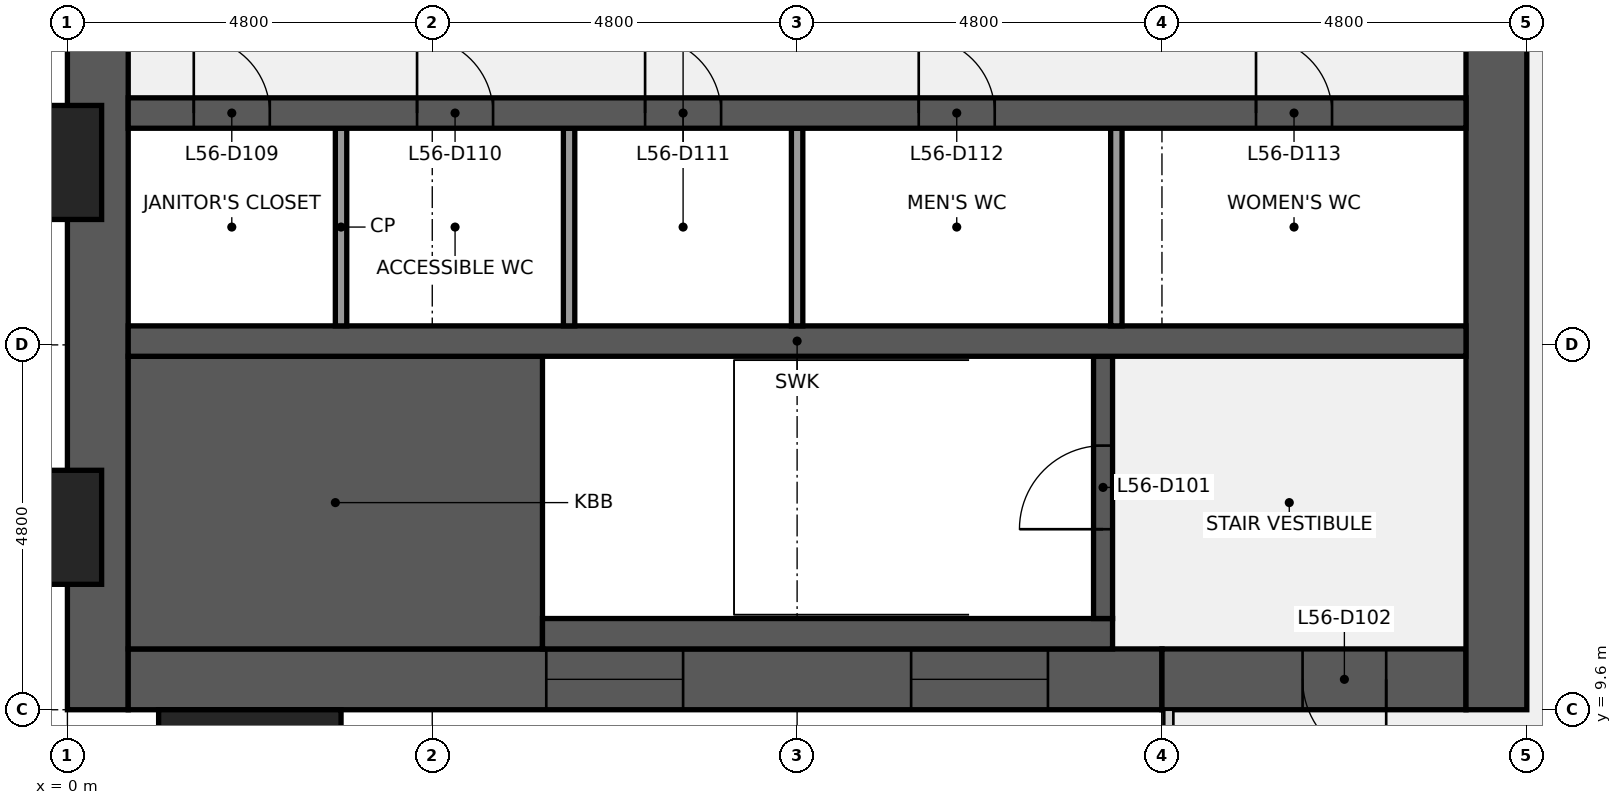
"""IFC4 building model, lengths in metres.
Left out: names, types, materials, properties, quantities, classifications, styles, units other than length and angle.
Written with IfcOpenShell. Run it as: python <this file> out.ifc"""

import sys

from ifc_helpers import new_model, si_unit, direction, frame, frame_2d, origin, origin_2d, place, context, subcontext, project, spatial, rectangle, extrude, element, fill, save


model = new_model("IFC4")
c1 = context("Model", 3, precision=1e-05, world=origin(), true_north=direction((0.0, 1.0)))
c2 = subcontext(c1, "Body", "Model", "MODEL_VIEW")
j1 = project(units=[si_unit("LENGTHUNIT", "METRE"), si_unit("PLANEANGLEUNIT", "RADIAN")], contexts=[c1])
p1 = place(None, origin())
s1 = spatial("IfcSite", under=j1, at=p1, CompositionType="ELEMENT")
p2 = place(p1, origin())
s2 = spatial("IfcBuilding", under=s1, at=p2, CompositionType="ELEMENT")
p3 = place(p2, frame((0.0, 0.0, 253.2)))
s3 = spatial("IfcBuildingStorey", under=s2, at=p3, CompositionType="ELEMENT", Elevation=253.2)
p4 = place(p3, frame((0.4, 9.6, 0.0), z_axis=(0.0, 0.0, 1.0), x_axis=(0.0, 1.0, 0.0)))
e1 = element("IfcWall", 1, at=p4, inside=s3, PredefinedType="SHEAR", context=c2, shape_type="SweptSolid", body=[
    extrude(rectangle(XDim=28.8, YDim=0.8, at=frame_2d((14.4, 0.0))), origin(), (0.0, 0.0, 1.0), 3.84),
])
p5 = place(p4, frame((8.85, 0.0, 0.9)))
e2 = element("IfcOpeningElement", 2, at=p5, cuts=e1, PredefinedType="OPENING", context=c2, shape_type="SweptSolid", body=[
    extrude(rectangle(XDim=1.5, YDim=1.5, at=frame_2d((0.75, 0.75))), frame((0.0, 0.41, 0.0), z_axis=(0.0, -1.0, 0.0), x_axis=(1.0, 0.0, 0.0)), (0.0, 0.0, 1.0), 0.82),
])
p6 = place(p4, frame((18.45, 0.0, 0.9)))
e3 = element("IfcOpeningElement", 3, at=p6, cuts=e1, PredefinedType="OPENING", context=c2, shape_type="SweptSolid", body=[
    extrude(rectangle(XDim=1.5, YDim=1.5, at=frame_2d((0.75, 0.75))), frame((0.0, 0.41, 0.0), z_axis=(0.0, -1.0, 0.0), x_axis=(1.0, 0.0, 0.0)), (0.0, 0.0, 1.0), 0.82),
])
p7 = place(p3, frame((14.4, 10.0, 0.0), z_axis=(0.0, 0.0, 1.0), x_axis=(-1.0, 0.0, 0.0)))
e4 = element("IfcWall", 4, at=p7, inside=s3, PredefinedType="SHEAR", context=c2, shape_type="SweptSolid", body=[
    extrude(rectangle(XDim=13.6, YDim=0.8, at=frame_2d((6.8, 0.0))), origin(), (0.0, 0.0, 1.0), 3.84),
])
p8 = place(p7, frame((6.3, 0.0, 0.9)))
e5 = element("IfcOpeningElement", 5, at=p8, cuts=e4, PredefinedType="OPENING", context=c2, shape_type="SweptSolid", body=[
    extrude(rectangle(XDim=1.8, YDim=1.5, at=frame_2d((0.9, 0.75))), frame((0.0, 0.41, 0.0), z_axis=(0.0, -1.0, 0.0), x_axis=(1.0, 0.0, 0.0)), (0.0, 0.0, 1.0), 0.82),
])
p9 = place(p7, frame((1.5, 0.0, 0.9)))
e6 = element("IfcOpeningElement", 6, at=p9, cuts=e4, PredefinedType="OPENING", context=c2, shape_type="SweptSolid", body=[
    extrude(rectangle(XDim=1.8, YDim=1.5, at=frame_2d((0.9, 0.75))), frame((0.0, 0.41, 0.0), z_axis=(0.0, -1.0, 0.0), x_axis=(1.0, 0.0, 0.0)), (0.0, 0.0, 1.0), 0.82),
])
p10 = place(p3, frame((18.4, 10.0, 0.0), z_axis=(0.0, 0.0, 1.0), x_axis=(-1.0, 0.0, 0.0)))
e7 = element("IfcWall", 7, at=p10, inside=s3, PredefinedType="SHEAR", context=c2, shape_type="SweptSolid", body=[
    extrude(rectangle(XDim=4.0, YDim=0.8, at=frame_2d((2.0, 0.0))), origin(), (0.0, 0.0, 1.0), 3.84),
])
p11 = place(p10, frame((1.05, 0.0, 0.0)))
e8 = element("IfcOpeningElement", 8, at=p11, cuts=e7, PredefinedType="OPENING", context=c2, shape_type="SweptSolid", body=[
    extrude(rectangle(XDim=1.1, YDim=2.1, at=frame_2d((0.55, 1.05))), frame((0.0, 0.41, 0.0), z_axis=(0.0, -1.0, 0.0), x_axis=(1.0, 0.0, 0.0)), (0.0, 0.0, 1.0), 0.82),
])
p12 = place(p3, frame((18.8, 38.4, 0.0), z_axis=(0.0, 0.0, 1.0), x_axis=(0.0, -1.0, 0.0)))
e9 = element("IfcWall", 9, at=p12, inside=s3, PredefinedType="SHEAR", context=c2, shape_type="SweptSolid", body=[
    extrude(rectangle(XDim=28.8, YDim=0.8, at=frame_2d((14.4, 0.0))), origin(), (0.0, 0.0, 1.0), 3.84),
])
p13 = place(p12, frame((18.3, 0.0, 0.0)))
e10 = element("IfcOpeningElement", 10, at=p13, cuts=e9, PredefinedType="OPENING", context=c2, shape_type="SweptSolid", body=[
    extrude(rectangle(XDim=1.8, YDim=2.1, at=frame_2d((0.9, 1.05))), frame((0.0, 0.41, 0.0), z_axis=(0.0, -1.0, 0.0), x_axis=(1.0, 0.0, 0.0)), (0.0, 0.0, 1.0), 0.82),
])
p14 = place(p12, frame((8.7, 0.0, 0.0)))
e11 = element("IfcOpeningElement", 11, at=p14, cuts=e9, PredefinedType="OPENING", context=c2, shape_type="SweptSolid", body=[
    extrude(rectangle(XDim=1.8, YDim=2.1, at=frame_2d((0.9, 1.05))), frame((0.0, 0.41, 0.0), z_axis=(0.0, -1.0, 0.0), x_axis=(1.0, 0.0, 0.0)), (0.0, 0.0, 1.0), 0.82),
])
p15 = place(p3, frame((0.8, 12.325, 0.0), z_axis=(0.0, 0.0, 1.0), x_axis=(1.0, 0.0, 0.0)))
e12 = element("IfcWall", 12, at=p15, inside=s3, PredefinedType="SHEAR", context=c2, shape_type="SweptSolid", body=[
    extrude(rectangle(XDim=5.45, YDim=3.85, at=frame_2d((2.725, 0.0))), origin(), (0.0, 0.0, 1.0), 3.84),
])
p16 = place(p3, frame((6.25, 10.6, 0.0), z_axis=(0.0, 0.0, 1.0), x_axis=(1.0, 0.0, 0.0)))
e13 = element("IfcWall", 13, at=p16, inside=s3, PredefinedType="SHEAR", context=c2, shape_type="SweptSolid", body=[
    extrude(rectangle(XDim=7.5, YDim=0.4, at=frame_2d((3.75, 0.0))), origin(), (0.0, 0.0, 1.0), 3.84),
])
p17 = place(p3, frame((13.625, 10.8, 0.0), z_axis=(0.0, 0.0, 1.0), x_axis=(0.0, 1.0, 0.0)))
e14 = element("IfcWall", 14, at=p17, inside=s3, PredefinedType="SHEAR", context=c2, shape_type="SweptSolid", body=[
    extrude(rectangle(XDim=3.45, YDim=0.25, at=frame_2d((1.725, 0.0))), origin(), (0.0, 0.0, 1.0), 3.84),
])
p18 = place(p17, frame((1.175, 0.0, 0.0)))
e15 = element("IfcOpeningElement", 15, at=p18, cuts=e14, PredefinedType="OPENING", context=c2, shape_type="SweptSolid", body=[
    extrude(rectangle(XDim=1.1, YDim=2.1, at=frame_2d((0.55, 1.05))), frame((0.0, 0.135, 0.0), z_axis=(0.0, -1.0, 0.0), x_axis=(1.0, 0.0, 0.0)), (0.0, 0.0, 1.0), 0.27),
])
p19 = place(p3, frame((0.8, 14.45, 0.0), z_axis=(0.0, 0.0, 1.0), x_axis=(1.0, 0.0, 0.0)))
e16 = element("IfcWall", 16, at=p19, inside=s3, PredefinedType="SHEAR", context=c2, shape_type="SweptSolid", body=[
    extrude(rectangle(XDim=17.6, YDim=0.4, at=frame_2d((8.8, 0.0))), origin(), (0.0, 0.0, 1.0), 3.84),
])
for number, where, z_axis, x_axis in (
    (17, (3.6, 14.65, 0.0), (0.0, 0.0, 1.0), (0.0, 1.0, 0.0)),
    (18, (6.6, 14.65, 0.0), (0.0, 0.0, 1.0), (0.0, 1.0, 0.0)),
    (19, (9.6, 14.65, 0.0), (0.0, 0.0, 1.0), (0.0, 1.0, 0.0)),
    (20, (13.8, 14.65, 0.0), (0.0, 0.0, 1.0), (0.0, 1.0, 0.0)),
):
    element("IfcWall", number, at=place(p3, frame(where, z_axis=z_axis, x_axis=x_axis)), inside=s3, PredefinedType="PARTITIONING", context=c2, shape_type="SweptSolid", body=[
        extrude(rectangle(XDim=2.6, YDim=0.15, at=frame_2d((1.3, 0.0))), origin(), (0.0, 0.0, 1.0), 3.84),
    ])
p20 = place(p3, frame((0.8, 17.45, 0.0), z_axis=(0.0, 0.0, 1.0), x_axis=(1.0, 0.0, 0.0)))
e21 = element("IfcWall", 21, at=p20, inside=s3, PredefinedType="SHEAR", context=c2, shape_type="SweptSolid", body=[
    extrude(rectangle(XDim=17.6, YDim=0.4, at=frame_2d((8.8, 0.0))), origin(), (0.0, 0.0, 1.0), 3.84),
])
p21 = place(p20, frame((0.863, 0.0, 0.0)))
e22 = element("IfcOpeningElement", 22, at=p21, cuts=e21, PredefinedType="OPENING", context=c2, shape_type="SweptSolid", body=[
    extrude(rectangle(XDim=1.0, YDim=2.1, at=frame_2d((0.5, 1.05))), frame((0.0, 0.21, 0.0), z_axis=(0.0, -1.0, 0.0), x_axis=(1.0, 0.0, 0.0)), (0.0, 0.0, 1.0), 0.42),
])
p22 = place(p20, frame((3.8, 0.0, 0.0)))
e23 = element("IfcOpeningElement", 23, at=p22, cuts=e21, PredefinedType="OPENING", context=c2, shape_type="SweptSolid", body=[
    extrude(rectangle(XDim=1.0, YDim=2.1, at=frame_2d((0.5, 1.05))), frame((0.0, 0.21, 0.0), z_axis=(0.0, -1.0, 0.0), x_axis=(1.0, 0.0, 0.0)), (0.0, 0.0, 1.0), 0.42),
])
p23 = place(p20, frame((6.8, 0.0, 0.0)))
e24 = element("IfcOpeningElement", 24, at=p23, cuts=e21, PredefinedType="OPENING", context=c2, shape_type="SweptSolid", body=[
    extrude(rectangle(XDim=1.0, YDim=2.1, at=frame_2d((0.5, 1.05))), frame((0.0, 0.21, 0.0), z_axis=(0.0, -1.0, 0.0), x_axis=(1.0, 0.0, 0.0)), (0.0, 0.0, 1.0), 0.42),
])
p24 = place(p20, frame((10.4, 0.0, 0.0)))
e25 = element("IfcOpeningElement", 25, at=p24, cuts=e21, PredefinedType="OPENING", context=c2, shape_type="SweptSolid", body=[
    extrude(rectangle(XDim=1.0, YDim=2.1, at=frame_2d((0.5, 1.05))), frame((0.0, 0.21, 0.0), z_axis=(0.0, -1.0, 0.0), x_axis=(1.0, 0.0, 0.0)), (0.0, 0.0, 1.0), 0.42),
])
p25 = place(p20, frame((14.837, 0.0, 0.0)))
e26 = element("IfcOpeningElement", 26, at=p25, cuts=e21, PredefinedType="OPENING", context=c2, shape_type="SweptSolid", body=[
    extrude(rectangle(XDim=1.0, YDim=2.1, at=frame_2d((0.5, 1.05))), frame((0.0, 0.21, 0.0), z_axis=(0.0, -1.0, 0.0), x_axis=(1.0, 0.0, 0.0)), (0.0, 0.0, 1.0), 0.42),
])
for number, where, z_axis, x_axis in (
    (27, (-0.75, 12.0, 0.0), (0.0, 0.0, 1.0), (0.0, 1.0, 0.0)),
    (28, (-0.75, 16.8, 0.0), (0.0, 0.0, 1.0), (0.0, 1.0, 0.0)),
    (29, (2.4, 8.85, 0.0), (0.0, 0.0, 1.0), (1.0, 0.0, 0.0)),
):
    element("IfcColumn", number, at=place(p3, frame(where, z_axis=z_axis, x_axis=x_axis)), inside=s3, PredefinedType="PILASTER", context=c2, shape_type="SweptSolid", body=[
        extrude(rectangle(XDim=2.4, YDim=1.5, at=origin_2d()), origin(), (0.0, 0.0, 1.0), 4.0),
    ])
p26 = place(p18, origin())
e30 = element("IfcDoor", 30, at=p26, inside=s3, OperationType="SINGLE_SWING_LEFT", PredefinedType="DOOR", context=c2, shape_type="SweptSolid", body=[
    extrude(rectangle(XDim=1.1, YDim=2.1, at=frame_2d((0.55, 1.05))), frame((0.0, 0.025, 0.0), z_axis=(0.0, -1.0, 0.0), x_axis=(1.0, 0.0, 0.0)), (0.0, 0.0, 1.0), 0.05),
])
fill(e15, e30)
p27 = place(p11, origin())
e31 = element("IfcDoor", 31, at=p27, inside=s3, OperationType="SINGLE_SWING_LEFT", PredefinedType="DOOR", context=c2, shape_type="SweptSolid", body=[
    extrude(rectangle(XDim=1.1, YDim=2.1, at=frame_2d((0.55, 1.05))), frame((0.0, 0.025, 0.0), z_axis=(0.0, -1.0, 0.0), x_axis=(1.0, 0.0, 0.0)), (0.0, 0.0, 1.0), 0.05),
])
fill(e8, e31)
p28 = place(p21, origin())
e32 = element("IfcDoor", 32, at=p28, inside=s3, OperationType="SINGLE_SWING_LEFT", PredefinedType="DOOR", context=c2, shape_type="SweptSolid", body=[
    extrude(rectangle(XDim=1.0, YDim=2.1, at=frame_2d((0.5, 1.05))), frame((0.0, 0.025, 0.0), z_axis=(0.0, -1.0, 0.0), x_axis=(1.0, 0.0, 0.0)), (0.0, 0.0, 1.0), 0.05),
])
fill(e22, e32)
p29 = place(p22, origin())
e33 = element("IfcDoor", 33, at=p29, inside=s3, OperationType="SINGLE_SWING_LEFT", PredefinedType="DOOR", context=c2, shape_type="SweptSolid", body=[
    extrude(rectangle(XDim=1.0, YDim=2.1, at=frame_2d((0.5, 1.05))), frame((0.0, 0.025, 0.0), z_axis=(0.0, -1.0, 0.0), x_axis=(1.0, 0.0, 0.0)), (0.0, 0.0, 1.0), 0.05),
])
fill(e23, e33)
p30 = place(p23, origin())
e34 = element("IfcDoor", 34, at=p30, inside=s3, OperationType="SINGLE_SWING_LEFT", PredefinedType="DOOR", context=c2, shape_type="SweptSolid", body=[
    extrude(rectangle(XDim=1.0, YDim=2.1, at=frame_2d((0.5, 1.05))), frame((0.0, 0.025, 0.0), z_axis=(0.0, -1.0, 0.0), x_axis=(1.0, 0.0, 0.0)), (0.0, 0.0, 1.0), 0.05),
])
fill(e24, e34)
p31 = place(p24, origin())
e35 = element("IfcDoor", 35, at=p31, inside=s3, OperationType="SINGLE_SWING_LEFT", PredefinedType="DOOR", context=c2, shape_type="SweptSolid", body=[
    extrude(rectangle(XDim=1.0, YDim=2.1, at=frame_2d((0.5, 1.05))), frame((0.0, 0.025, 0.0), z_axis=(0.0, -1.0, 0.0), x_axis=(1.0, 0.0, 0.0)), (0.0, 0.0, 1.0), 0.05),
])
fill(e25, e35)
p32 = place(p25, origin())
e36 = element("IfcDoor", 36, at=p32, inside=s3, OperationType="SINGLE_SWING_LEFT", PredefinedType="DOOR", context=c2, shape_type="SweptSolid", body=[
    extrude(rectangle(XDim=1.0, YDim=2.1, at=frame_2d((0.5, 1.05))), frame((0.0, 0.025, 0.0), z_axis=(0.0, -1.0, 0.0), x_axis=(1.0, 0.0, 0.0)), (0.0, 0.0, 1.0), 0.05),
])
fill(e26, e36)
p33 = place(p8, origin())
e37 = element("IfcWindow", 37, at=p33, inside=s3, PartitioningType="SINGLE_PANEL", PredefinedType="WINDOW", context=c2, shape_type="SweptSolid", body=[
    extrude(rectangle(XDim=1.8, YDim=1.5, at=frame_2d((0.9, 0.75))), frame((0.0, 0.03, 0.0), z_axis=(0.0, -1.0, 0.0), x_axis=(1.0, 0.0, 0.0)), (0.0, 0.0, 1.0), 0.06),
])
fill(e5, e37)
p34 = place(p9, origin())
e38 = element("IfcWindow", 38, at=p34, inside=s3, PartitioningType="SINGLE_PANEL", PredefinedType="WINDOW", context=c2, shape_type="SweptSolid", body=[
    extrude(rectangle(XDim=1.8, YDim=1.5, at=frame_2d((0.9, 0.75))), frame((0.0, 0.03, 0.0), z_axis=(0.0, -1.0, 0.0), x_axis=(1.0, 0.0, 0.0)), (0.0, 0.0, 1.0), 0.06),
])
fill(e6, e38)
save(model, sys.argv[1])
